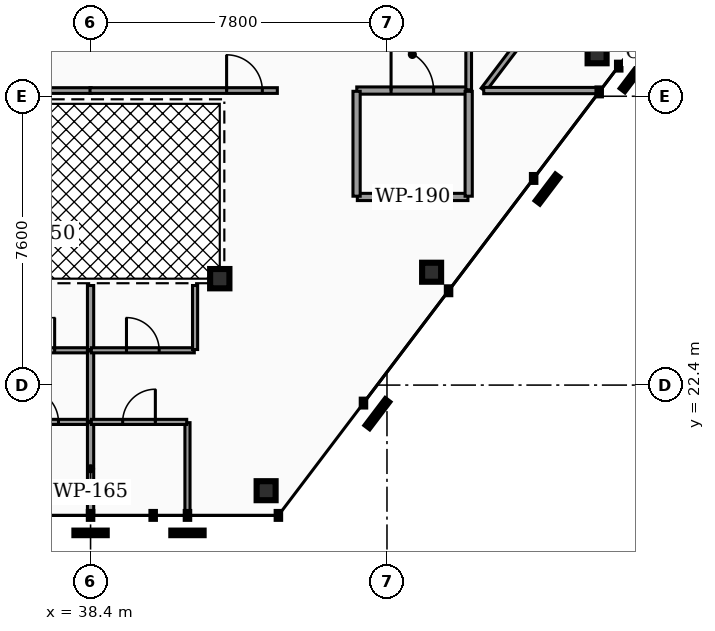
"""IFC4 building model, lengths in metres.
Left out: names, types, materials, properties, quantities, classifications, styles, units other than length and angle.
Written with IfcOpenShell. Run it as: python <this file> out.ifc"""

import sys

from ifc_helpers import new_model, si_unit, direction, frame, frame_2d, origin, origin_2d, place, context, subcontext, project, spatial, rectangle, hollow_rectangle, hollow_circle, extrude, element, fill, save


model = new_model("IFC4")
c1 = context("Model", 3, precision=1e-05, world=origin(), true_north=direction((0.0, 1.0)))
c2 = subcontext(c1, "Body", "Model", "MODEL_VIEW")
j1 = project(units=[si_unit("LENGTHUNIT", "METRE"), si_unit("PLANEANGLEUNIT", "RADIAN")], contexts=[c1])
p1 = place(None, origin())
s1 = spatial("IfcSite", under=j1, at=p1, CompositionType="ELEMENT")
p2 = place(p1, origin())
s2 = spatial("IfcBuilding", under=s1, at=p2, CompositionType="ELEMENT")
p3 = place(p2, frame((0.0, 0.0, 265.2)))
s3 = spatial("IfcBuildingStorey", under=s2, at=p3, CompositionType="ELEMENT", Elevation=265.2)
p4 = place(p3, frame((43.02, 19.621, 0.0), z_axis=(-0.128637114564, 0.128939079622, 0.983273719014), x_axis=(-0.70793525928, -0.706277331272, 0.0)))
e1 = element("IfcColumn", 1, at=p4, inside=s3, PredefinedType="COLUMN", context=c2, shape_type="SweptSolid", body=[
    extrude(hollow_rectangle(XDim=0.5, YDim=0.5, WallThickness=0.025, at=origin_2d()), origin(), (0.0, 0.0, 1.0), 3.234),
])
p5 = place(p3, frame((47.375, 25.369, 0.0), z_axis=(-0.134803662972, 0.123859356628, 0.983100621618), x_axis=(-0.676582996942, -0.736366381803, 0.0)))
e2 = element("IfcColumn", 2, at=p5, inside=s3, PredefinedType="COLUMN", context=c2, shape_type="SweptSolid", body=[
    extrude(hollow_rectangle(XDim=0.5, YDim=0.5, WallThickness=0.025, at=origin_2d()), origin(), (0.0, 0.0, 1.0), 3.235),
])
p6 = place(p3, frame((51.729, 31.117, 0.0), z_axis=(-0.140882555326, 0.118923892445, 0.982857677088), x_axis=(-0.645042764465, -0.764146472878, 0.0)))
e3 = element("IfcColumn", 3, at=p6, inside=s3, PredefinedType="COLUMN", context=c2, shape_type="SweptSolid", body=[
    extrude(hollow_rectangle(XDim=0.5, YDim=0.5, WallThickness=0.025, at=origin_2d()), origin(), (0.0, 0.0, 1.0), 3.235),
])
p7 = place(p3, frame((41.8, 25.2, 0.0), z_axis=(0.0, 0.0, 1.0), x_axis=(1.0, 0.0, 0.0)))
e4 = element("IfcColumn", 4, at=p7, inside=s3, PredefinedType="COLUMN", context=c2, shape_type="SweptSolid", body=[
    extrude(hollow_circle(Radius=0.254, WallThickness=0.02, at=origin_2d()), origin(), (0.0, 0.0, 1.0), 3.18),
])
p8 = place(p3, frame((45.405, 30.15, 0.0), z_axis=(0.0, 0.0, 1.0), x_axis=(1.0, 0.0, 0.0)))
e5 = element("IfcWall", 5, at=p8, inside=s3, PredefinedType="PARTITIONING", context=c2, shape_type="SweptSolid", body=[
    extrude(rectangle(XDim=2.925, YDim=0.19, at=frame_2d((1.462, 0.0))), origin(), (0.0, 0.0, 1.0), 2.235),
])
p9 = place(p8, frame((0.903, 0.0, 0.0)))
e6 = element("IfcOpeningElement", 6, at=p9, cuts=e5, PredefinedType="OPENING", context=c2, shape_type="SweptSolid", body=[
    extrude(rectangle(XDim=1.12, YDim=2.05, at=frame_2d((0.56, 1.025))), frame((0.0, 0.105, 0.0), z_axis=(0.0, -1.0, 0.0), x_axis=(1.0, 0.0, 0.0)), (0.0, 0.0, 1.0), 0.21),
])
p10 = place(p3, frame((48.35, 30.17, 0.0), z_axis=(0.0, 0.0, 1.0), x_axis=(0.0, 1.0, 0.0)))
e7 = element("IfcWall", 7, at=p10, inside=s3, PredefinedType="PARTITIONING", context=c2, shape_type="SweptSolid", body=[
    extrude(rectangle(XDim=3.06, YDim=0.15, at=frame_2d((1.53, 0.0))), origin(), (0.0, 0.0, 1.0), 2.235),
])
p11 = place(p3, frame((33.485, 30.15, 0.0), z_axis=(0.0, 0.0, 1.0), x_axis=(1.0, 0.0, 0.0)))
e8 = element("IfcWall", 8, at=p11, inside=s3, PredefinedType="PARTITIONING", context=c2, shape_type="SweptSolid", body=[
    extrude(rectangle(XDim=4.93, YDim=0.15, at=frame_2d((2.465, 0.0))), origin(), (0.0, 0.0, 1.0), 2.235),
])
p12 = place(p11, frame((0.395, 0.0, 0.0)))
e9 = element("IfcOpeningElement", 9, at=p12, cuts=e8, PredefinedType="OPENING", context=c2, shape_type="SweptSolid", body=[
    extrude(rectangle(XDim=0.94, YDim=2.05, at=frame_2d((0.47, 1.025))), frame((0.0, 0.085, 0.0), z_axis=(0.0, -1.0, 0.0), x_axis=(1.0, 0.0, 0.0)), (0.0, 0.0, 1.0), 0.17),
])
p13 = place(p3, frame((38.385, 30.15, 0.0), z_axis=(0.0, 0.0, 1.0), x_axis=(1.0, 0.0, 0.0)))
e10 = element("IfcWall", 10, at=p13, inside=s3, PredefinedType="PARTITIONING", context=c2, shape_type="SweptSolid", body=[
    extrude(rectangle(XDim=4.93, YDim=0.15, at=frame_2d((2.465, 0.0))), origin(), (0.0, 0.0, 1.0), 2.235),
])
p14 = place(p13, frame((3.595, 0.0, 0.0)))
e11 = element("IfcOpeningElement", 11, at=p14, cuts=e10, PredefinedType="OPENING", context=c2, shape_type="SweptSolid", body=[
    extrude(rectangle(XDim=0.94, YDim=2.05, at=frame_2d((0.47, 1.025))), frame((0.0, 0.085, 0.0), z_axis=(0.0, -1.0, 0.0), x_axis=(1.0, 0.0, 0.0)), (0.0, 0.0, 1.0), 0.17),
])
p15 = place(p3, frame((45.42, 27.35, 0.0), z_axis=(0.0, 0.0, 1.0), x_axis=(1.0, 0.0, 0.0)))
e12 = element("IfcWall", 12, at=p15, inside=s3, PredefinedType="PARTITIONING", context=c2, shape_type="SweptSolid", body=[
    extrude(rectangle(XDim=2.91, YDim=0.19, at=frame_2d((1.455, 0.0))), origin(), (0.0, 0.0, 1.0), 2.235),
])
for number, where, z_axis, x_axis in (
    (13, (45.4, 27.37, 0.0), (0.0, 0.0, 1.0), (0.0, 1.0, 0.0)),
    (14, (48.35, 27.37, 0.0), (0.0, 0.0, 1.0), (0.0, 1.0, 0.0)),
):
    element("IfcWall", number, at=place(p3, frame(where, z_axis=z_axis, x_axis=x_axis)), inside=s3, PredefinedType="PARTITIONING", context=c2, shape_type="SweptSolid", body=[
        extrude(rectangle(XDim=2.76, YDim=0.19, at=frame_2d((1.38, 0.0))), origin(), (0.0, 0.0, 1.0), 2.235),
    ])
p16 = place(p3, frame((48.738, 30.166, 0.0), z_axis=(0.0, 0.0, 1.0), x_axis=(0.603839951985, 0.797105584215, 0.0)))
e15 = element("IfcWall", 15, at=p16, inside=s3, PredefinedType="PARTITIONING", context=c2, shape_type="SweptSolid", body=[
    extrude(rectangle(XDim=2.65, YDim=0.15, at=frame_2d((1.325, 0.0))), origin(), (0.0, 0.0, 1.0), 2.235),
])
p17 = place(p3, frame((35.67, 23.316, 0.0), z_axis=(0.0, 0.0, 1.0), x_axis=(1.0, 0.0, 0.0)))
e16 = element("IfcWall", 16, at=p17, inside=s3, PredefinedType="PARTITIONING", context=c2, shape_type="SweptSolid", body=[
    extrude(rectangle(XDim=2.71, YDim=0.135, at=frame_2d((1.355, 0.0))), origin(), (0.0, 0.0, 1.0), 2.235),
])
p18 = place(p17, frame((0.925, 0.0, 0.0)))
e17 = element("IfcOpeningElement", 17, at=p18, cuts=e16, PredefinedType="OPENING", context=c2, shape_type="SweptSolid", body=[
    extrude(rectangle(XDim=0.86, YDim=2.05, at=frame_2d((0.43, 1.025))), frame((0.0, 0.077, 0.0), z_axis=(0.0, -1.0, 0.0), x_axis=(1.0, 0.0, 0.0)), (0.0, 0.0, 1.0), 0.155),
])
p19 = place(p3, frame((35.87, 21.431, 0.0), z_axis=(0.0, 0.0, 1.0), x_axis=(1.0, 0.0, 0.0)))
e18 = element("IfcWall", 18, at=p19, inside=s3, PredefinedType="PARTITIONING", context=c2, shape_type="SweptSolid", body=[
    extrude(rectangle(XDim=2.51, YDim=0.135, at=frame_2d((1.255, 0.0))), origin(), (0.0, 0.0, 1.0), 2.235),
])
p20 = place(p19, frame((0.825, 0.0, 0.0)))
e19 = element("IfcOpeningElement", 19, at=p20, cuts=e18, PredefinedType="OPENING", context=c2, shape_type="SweptSolid", body=[
    extrude(rectangle(XDim=0.86, YDim=2.05, at=frame_2d((0.43, 1.025))), frame((0.0, 0.077, 0.0), z_axis=(0.0, -1.0, 0.0), x_axis=(1.0, 0.0, 0.0)), (0.0, 0.0, 1.0), 0.155),
])
p21 = place(p3, frame((38.4, 21.451, 0.0), z_axis=(0.0, 0.0, 1.0), x_axis=(0.0, 1.0, 0.0)))
e20 = element("IfcWall", 20, at=p21, inside=s3, PredefinedType="PARTITIONING", context=c2, shape_type="SweptSolid", body=[
    extrude(rectangle(XDim=1.844, YDim=0.165, at=frame_2d((0.922, 0.0))), origin(), (0.0, 0.0, 1.0), 2.235),
])
p22 = place(p3, frame((38.4, 23.336, 0.0), z_axis=(0.0, 0.0, 1.0), x_axis=(0.0, 1.0, 0.0)))
e21 = element("IfcWall", 21, at=p22, inside=s3, PredefinedType="PARTITIONING", context=c2, shape_type="SweptSolid", body=[
    extrude(rectangle(XDim=1.684, YDim=0.165, at=frame_2d((0.842, 0.0))), origin(), (0.0, 0.0, 1.0), 2.235),
])
p23 = place(p3, frame((38.4, 18.986, 0.0), z_axis=(0.0, 0.0, 1.0), x_axis=(0.0, 1.0, 0.0)))
e22 = element("IfcWall", 22, at=p23, inside=s3, PredefinedType="PARTITIONING", context=c2, shape_type="SweptSolid", body=[
    extrude(rectangle(XDim=2.425, YDim=0.165, at=frame_2d((1.212, 0.0))), origin(), (0.0, 0.0, 1.0), 2.235),
])
p24 = place(p3, frame((38.42, 23.316, 0.0), z_axis=(0.0, 0.0, 1.0), x_axis=(1.0, 0.0, 0.0)))
e23 = element("IfcWall", 23, at=p24, inside=s3, PredefinedType="PARTITIONING", context=c2, shape_type="SweptSolid", body=[
    extrude(rectangle(XDim=2.71, YDim=0.135, at=frame_2d((1.355, 0.0))), origin(), (0.0, 0.0, 1.0), 2.235),
])
p25 = place(p24, frame((0.925, 0.0, 0.0)))
e24 = element("IfcOpeningElement", 24, at=p25, cuts=e23, PredefinedType="OPENING", context=c2, shape_type="SweptSolid", body=[
    extrude(rectangle(XDim=0.86, YDim=2.05, at=frame_2d((0.43, 1.025))), frame((0.0, 0.077, 0.0), z_axis=(0.0, -1.0, 0.0), x_axis=(1.0, 0.0, 0.0)), (0.0, 0.0, 1.0), 0.155),
])
p26 = place(p3, frame((41.15, 23.336, 0.0), z_axis=(0.0, 0.0, 1.0), x_axis=(0.0, 1.0, 0.0)))
e25 = element("IfcWall", 25, at=p26, inside=s3, PredefinedType="PARTITIONING", context=c2, shape_type="SweptSolid", body=[
    extrude(rectangle(XDim=1.684, YDim=0.135, at=frame_2d((0.842, 0.0))), origin(), (0.0, 0.0, 1.0), 2.235),
])
p27 = place(p3, frame((40.95, 18.986, 0.0), z_axis=(0.0, 0.0, 1.0), x_axis=(0.0, 1.0, 0.0)))
e26 = element("IfcWall", 26, at=p27, inside=s3, PredefinedType="PARTITIONING", context=c2, shape_type="SweptSolid", body=[
    extrude(rectangle(XDim=2.425, YDim=0.135, at=frame_2d((1.212, 0.0))), origin(), (0.0, 0.0, 1.0), 2.235),
])
p28 = place(p3, frame((38.42, 21.431, 0.0), z_axis=(0.0, 0.0, 1.0), x_axis=(1.0, 0.0, 0.0)))
e27 = element("IfcWall", 27, at=p28, inside=s3, PredefinedType="PARTITIONING", context=c2, shape_type="SweptSolid", body=[
    extrude(rectangle(XDim=2.51, YDim=0.135, at=frame_2d((1.255, 0.0))), origin(), (0.0, 0.0, 1.0), 2.235),
])
p29 = place(p28, frame((0.825, 0.0, 0.0)))
e28 = element("IfcOpeningElement", 28, at=p29, cuts=e27, PredefinedType="OPENING", context=c2, shape_type="SweptSolid", body=[
    extrude(rectangle(XDim=0.86, YDim=2.05, at=frame_2d((0.43, 1.025))), frame((0.0, 0.077, 0.0), z_axis=(0.0, -1.0, 0.0), x_axis=(1.0, 0.0, 0.0)), (0.0, 0.0, 1.0), 0.155),
])
p30 = place(p3, frame((48.745, 30.15, 0.0), z_axis=(0.0, 0.0, 1.0), x_axis=(1.0, 0.0, 0.0)))
e29 = element("IfcWall", 29, at=p30, inside=s3, PredefinedType="PARTITIONING", context=c2, shape_type="SweptSolid", body=[
    extrude(rectangle(XDim=3.051, YDim=0.165, at=frame_2d((1.526, 0.0))), origin(), (0.0, 0.0, 1.0), 2.235),
])
p31 = place(p9, origin())
e30 = element("IfcDoor", 30, at=p31, inside=s3, OperationType="SINGLE_SWING_LEFT", PredefinedType="DOOR", context=c2, shape_type="SweptSolid", body=[
    extrude(rectangle(XDim=1.12, YDim=2.05, at=frame_2d((0.56, 1.025))), frame((0.0, 0.025, 0.0), z_axis=(0.0, -1.0, 0.0), x_axis=(1.0, 0.0, 0.0)), (0.0, 0.0, 1.0), 0.05),
])
fill(e6, e30)
p32 = place(p14, origin())
e31 = element("IfcDoor", 31, at=p32, inside=s3, OperationType="SINGLE_SWING_LEFT", PredefinedType="DOOR", context=c2, shape_type="SweptSolid", body=[
    extrude(rectangle(XDim=0.94, YDim=2.05, at=frame_2d((0.47, 1.025))), frame((0.0, 0.025, 0.0), z_axis=(0.0, -1.0, 0.0), x_axis=(1.0, 0.0, 0.0)), (0.0, 0.0, 1.0), 0.05),
])
fill(e11, e31)
p33 = place(p18, origin())
e32 = element("IfcDoor", 32, at=p33, inside=s3, OperationType="SINGLE_SWING_RIGHT", PredefinedType="DOOR", context=c2, shape_type="SweptSolid", body=[
    extrude(rectangle(XDim=0.86, YDim=2.05, at=frame_2d((0.43, 1.025))), frame((0.0, 0.025, 0.0), z_axis=(0.0, -1.0, 0.0), x_axis=(1.0, 0.0, 0.0)), (0.0, 0.0, 1.0), 0.05),
])
fill(e17, e32)
p34 = place(p20, origin())
e33 = element("IfcDoor", 33, at=p34, inside=s3, OperationType="SINGLE_SWING_LEFT", PredefinedType="DOOR", context=c2, shape_type="SweptSolid", body=[
    extrude(rectangle(XDim=0.86, YDim=2.05, at=frame_2d((0.43, 1.025))), frame((0.0, 0.025, 0.0), z_axis=(0.0, -1.0, 0.0), x_axis=(1.0, 0.0, 0.0)), (0.0, 0.0, 1.0), 0.05),
])
fill(e19, e33)
p35 = place(p25, origin())
e34 = element("IfcDoor", 34, at=p35, inside=s3, OperationType="SINGLE_SWING_LEFT", PredefinedType="DOOR", context=c2, shape_type="SweptSolid", body=[
    extrude(rectangle(XDim=0.86, YDim=2.05, at=frame_2d((0.43, 1.025))), frame((0.0, 0.025, 0.0), z_axis=(0.0, -1.0, 0.0), x_axis=(1.0, 0.0, 0.0)), (0.0, 0.0, 1.0), 0.05),
])
fill(e24, e34)
p36 = place(p29, origin())
e35 = element("IfcDoor", 35, at=p36, inside=s3, OperationType="SINGLE_SWING_RIGHT", PredefinedType="DOOR", context=c2, shape_type="SweptSolid", body=[
    extrude(rectangle(XDim=0.86, YDim=2.05, at=frame_2d((0.43, 1.025))), frame((0.0, 0.025, 0.0), z_axis=(0.0, -1.0, 0.0), x_axis=(1.0, 0.0, 0.0)), (0.0, 0.0, 1.0), 0.05),
])
fill(e28, e35)
save(model, sys.argv[1])
